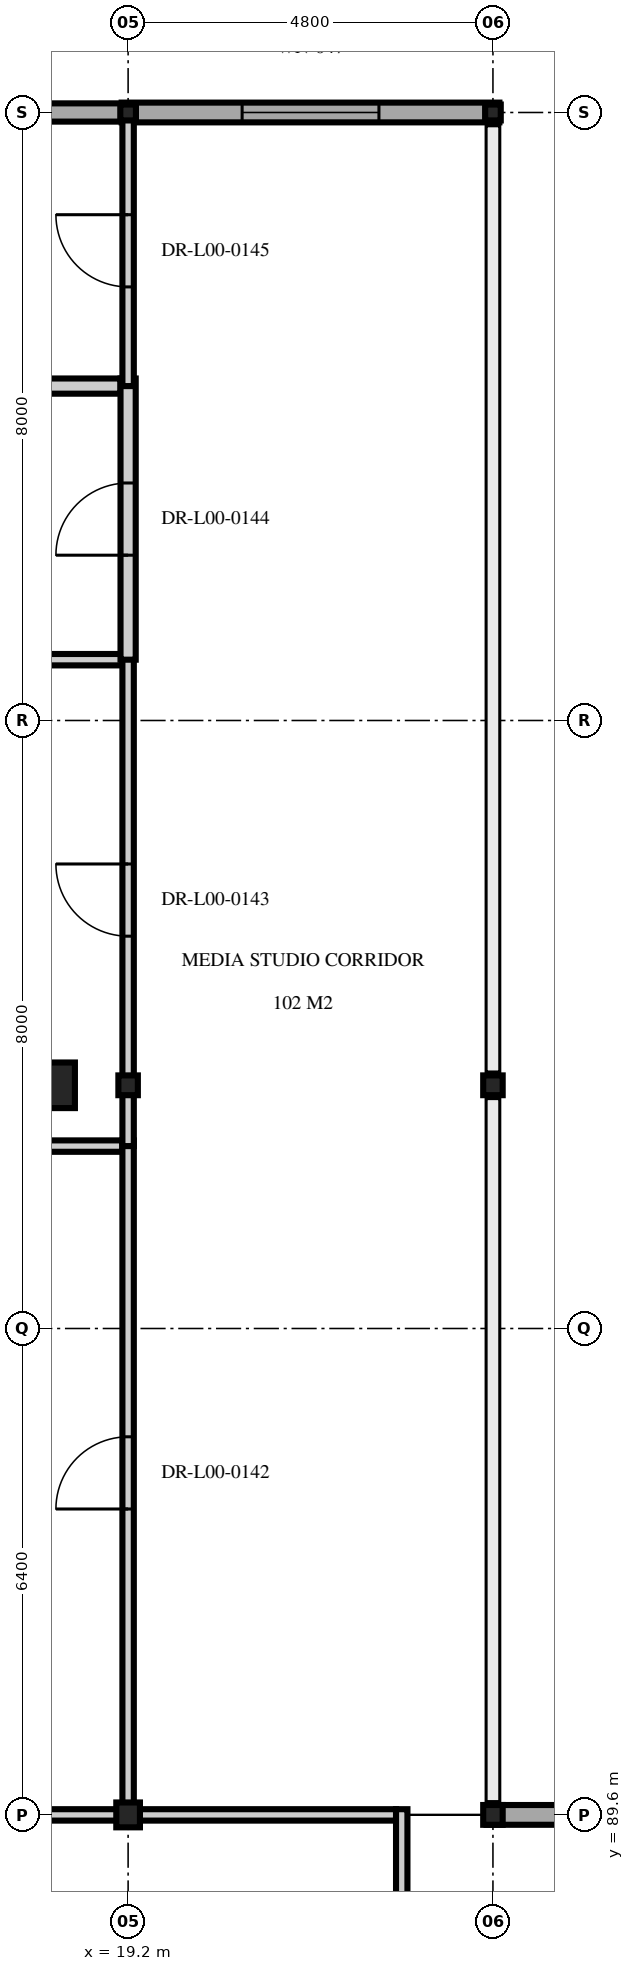
"""IFC4 building model, lengths in metres.
Left out: names, types, materials, properties, quantities, classifications, styles, units other than length and angle.
Written with IfcOpenShell. Run it as: python <this file> out.ifc"""

import sys

from ifc_helpers import new_model, si_unit, direction, frame, frame_2d, origin, origin_2d, place, context, subcontext, project, spatial, rectangle, i_section, extrude, element, fill, save


model = new_model("IFC4")
c1 = context("Model", 3, precision=1e-05, world=origin(), true_north=direction((0.0, 1.0)))
c2 = subcontext(c1, "Body", "Model", "MODEL_VIEW")
j1 = project(units=[si_unit("LENGTHUNIT", "METRE"), si_unit("PLANEANGLEUNIT", "RADIAN")], contexts=[c1])
p1 = place(None, origin())
s1 = spatial("IfcSite", under=j1, at=p1, CompositionType="ELEMENT")
p2 = place(p1, origin())
s2 = spatial("IfcBuilding", under=s1, at=p2, CompositionType="ELEMENT")
p3 = place(p2, origin())
s3 = spatial("IfcBuildingStorey", under=s2, at=p3, CompositionType="ELEMENT", Elevation=0.0)
p4 = place(p3, frame((19.2, 89.6, 0.0), z_axis=(0.0, 0.0, 1.0), x_axis=(1.0, 0.0, 0.0)))
e1 = element("IfcColumn", 1, at=p4, inside=s3, PredefinedType="COLUMN", context=c2, shape_type="SweptSolid", body=[
    extrude(i_section(OverallWidth=0.311, OverallDepth=0.327, WebThickness=0.016, FlangeThickness=0.025, at=origin_2d()), origin(), (0.0, 0.0, 1.0), 5.1),
])
p5 = place(p3, frame((19.2, 99.2, 0.0), z_axis=(0.0, 0.0, 1.0), x_axis=(1.0, 0.0, 0.0)))
e2 = element("IfcColumn", 2, at=p5, inside=s3, PredefinedType="COLUMN", context=c2, shape_type="SweptSolid", body=[
    extrude(i_section(OverallWidth=0.256, OverallDepth=0.26, WebThickness=0.01, FlangeThickness=0.017, at=origin_2d()), origin(), (0.0, 0.0, 1.0), 5.1),
])
p6 = place(p3, frame((19.2, 112.0, 0.0), z_axis=(0.0, 0.0, 1.0), x_axis=(1.0, 0.0, 0.0)))
e3 = element("IfcColumn", 3, at=p6, inside=s3, PredefinedType="COLUMN", context=c2, shape_type="SweptSolid", body=[
    extrude(i_section(OverallWidth=0.206, OverallDepth=0.21, WebThickness=0.01, FlangeThickness=0.014, at=origin_2d()), origin(), (0.0, 0.0, 1.0), 4.91),
])
p7 = place(p3, frame((24.0, 99.2, 0.0), z_axis=(0.0, 0.0, 1.0), x_axis=(1.0, 0.0, 0.0)))
e4 = element("IfcColumn", 4, at=p7, inside=s3, PredefinedType="COLUMN", context=c2, shape_type="SweptSolid", body=[
    extrude(i_section(OverallWidth=0.256, OverallDepth=0.26, WebThickness=0.01, FlangeThickness=0.017, at=origin_2d()), origin(), (0.0, 0.0, 1.0), 5.1),
])
p8 = place(p3, frame((24.0, 112.0, 0.0), z_axis=(0.0, 0.0, 1.0), x_axis=(1.0, 0.0, 0.0)))
e5 = element("IfcColumn", 5, at=p8, inside=s3, PredefinedType="COLUMN", context=c2, shape_type="SweptSolid", body=[
    extrude(i_section(OverallWidth=0.206, OverallDepth=0.21, WebThickness=0.01, FlangeThickness=0.014, at=origin_2d()), origin(), (0.0, 0.0, 1.0), 4.91),
])
p9 = place(p3, frame((24.0, 89.6, 0.0), z_axis=(0.0, 0.0, 1.0), x_axis=(1.0, 0.0, 0.0)))
e6 = element("IfcColumn", 6, at=p9, inside=s3, PredefinedType="COLUMN", context=c2, shape_type="SweptSolid", body=[
    extrude(i_section(OverallWidth=0.256, OverallDepth=0.26, WebThickness=0.01, FlangeThickness=0.017, at=origin_2d()), origin(), (0.0, 0.0, 1.0), 5.1),
])
p10 = place(p3, frame((18.2, 99.2, 0.0), z_axis=(0.0, 0.0, 1.0), x_axis=(1.0, 0.0, 0.0)))
e7 = element("IfcColumn", 7, at=p10, inside=s3, PredefinedType="COLUMN", context=c2, shape_type="SweptSolid", body=[
    extrude(rectangle(XDim=0.6, YDim=0.6, at=origin_2d()), origin(), (0.0, 0.0, 1.0), 5.1),
])
p11 = place(p3, frame((23.915, 89.6, 0.0), z_axis=(0.0, 0.0, 1.0), x_axis=(1.0, 0.0, 0.0)))
e8 = element("IfcWall", 8, at=p11, inside=s3, PredefinedType="SOLIDWALL", context=c2, shape_type="SweptSolid", body=[
    extrude(rectangle(XDim=4.97, YDim=0.26, at=frame_2d((2.485, 0.0))), origin(), (0.0, 0.0, 1.0), 4.355),
])
p12 = place(p3, frame((9.515, 112.0, 0.0), z_axis=(0.0, 0.0, 1.0), x_axis=(1.0, 0.0, 0.0)))
e9 = element("IfcWall", 9, at=p12, inside=s3, PredefinedType="SOLIDWALL", context=c2, shape_type="SweptSolid", body=[
    extrude(rectangle(XDim=9.77, YDim=0.24, at=frame_2d((4.885, 0.0))), origin(), (0.0, 0.0, 1.0), 4.495),
])
p13 = place(p12, frame((3.585, 0.0, 0.0)))
e10 = element("IfcOpeningElement", 10, at=p13, cuts=e9, PredefinedType="OPENING", context=c2, shape_type="SweptSolid", body=[
    extrude(rectangle(XDim=2.6, YDim=2.6, at=frame_2d((1.3, 1.3))), frame((0.0, 0.13, 0.0), z_axis=(0.0, -1.0, 0.0), x_axis=(1.0, 0.0, 0.0)), (0.0, 0.0, 1.0), 0.26),
])
p14 = place(p3, frame((19.115, 112.0, 0.0), z_axis=(0.0, 0.0, 1.0), x_axis=(1.0, 0.0, 0.0)))
e11 = element("IfcWall", 11, at=p14, inside=s3, PredefinedType="SOLIDWALL", context=c2, shape_type="SweptSolid", body=[
    extrude(rectangle(XDim=4.97, YDim=0.26, at=frame_2d((2.485, 0.0))), origin(), (0.0, 0.0, 1.0), 4.495),
])
p15 = place(p14, frame((1.585, 0.0, 1.0)))
e12 = element("IfcOpeningElement", 12, at=p15, cuts=e11, PredefinedType="OPENING", context=c2, shape_type="SweptSolid", body=[
    extrude(rectangle(XDim=1.8, YDim=2.1, at=frame_2d((0.9, 1.05))), frame((0.0, 0.14, 0.0), z_axis=(0.0, -1.0, 0.0), x_axis=(1.0, 0.0, 0.0)), (0.0, 0.0, 1.0), 0.28),
])
p16 = place(p3, frame((0.04, 89.6, 0.0), z_axis=(0.0, 0.0, 1.0), x_axis=(1.0, 0.0, 0.0)))
e13 = element("IfcWall", 13, at=p16, inside=s3, PredefinedType="PARTITIONING", context=c2, shape_type="SweptSolid", body=[
    extrude(rectangle(XDim=22.685, YDim=0.15, at=frame_2d((11.343, 0.0))), origin(), (0.0, 0.0, 1.0), 4.355),
])
p17 = place(p3, frame((22.8, 80.0, 0.0), z_axis=(0.0, 0.0, 1.0), x_axis=(0.0, 1.0, 0.0)))
e14 = element("IfcWall", 14, at=p17, inside=s3, PredefinedType="PARTITIONING", context=c2, shape_type="SweptSolid", body=[
    extrude(rectangle(XDim=9.675, YDim=0.15, at=frame_2d((4.837, 0.0))), origin(), (0.0, 0.0, 1.0), 4.355),
])
p18 = place(p17, frame((4.362, 0.0, 0.0)))
e15 = element("IfcOpeningElement", 15, at=p18, cuts=e14, PredefinedType="OPENING", context=c2, shape_type="SweptSolid", body=[
    extrude(rectangle(XDim=0.95, YDim=2.15, at=frame_2d((0.475, 1.075))), frame((0.0, 0.085, 0.0), z_axis=(0.0, -1.0, 0.0), x_axis=(1.0, 0.0, 0.0)), (0.0, 0.0, 1.0), 0.17),
])
p19 = place(p3, frame((0.04, 98.4, 0.0), z_axis=(0.0, 0.0, 1.0), x_axis=(1.0, 0.0, 0.0)))
e16 = element("IfcWall", 16, at=p19, inside=s3, PredefinedType="PARTITIONING", context=c2, shape_type="SweptSolid", body=[
    extrude(rectangle(XDim=19.085, YDim=0.15, at=frame_2d((9.542, 0.0))), origin(), (0.0, 0.0, 1.0), 4.552),
])
p20 = place(p3, frame((19.2, 89.725, 0.0), z_axis=(0.0, 0.0, 1.0), x_axis=(0.0, 1.0, 0.0)))
e17 = element("IfcWall", 17, at=p20, inside=s3, PredefinedType="PARTITIONING", context=c2, shape_type="SweptSolid", body=[
    extrude(rectangle(XDim=8.75, YDim=0.15, at=frame_2d((4.375, 0.0))), origin(), (0.0, 0.0, 1.0), 4.355),
])
p21 = place(p20, frame((3.9, 0.0, 0.0)))
e18 = element("IfcOpeningElement", 18, at=p21, cuts=e17, PredefinedType="OPENING", context=c2, shape_type="SweptSolid", body=[
    extrude(rectangle(XDim=0.95, YDim=2.15, at=frame_2d((0.475, 1.075))), frame((0.0, 0.085, 0.0), z_axis=(0.0, -1.0, 0.0), x_axis=(1.0, 0.0, 0.0)), (0.0, 0.0, 1.0), 0.17),
])
p22 = place(p3, frame((0.04, 104.8, 0.0), z_axis=(0.0, 0.0, 1.0), x_axis=(1.0, 0.0, 0.0)))
e19 = element("IfcWall", 19, at=p22, inside=s3, PredefinedType="PARTITIONING", context=c2, shape_type="SweptSolid", body=[
    extrude(rectangle(XDim=19.085, YDim=0.15, at=frame_2d((9.542, 0.0))), origin(), (0.0, 0.0, 1.0), 4.525),
])
p23 = place(p3, frame((19.2, 98.4, 0.0), z_axis=(0.0, 0.0, 1.0), x_axis=(0.0, 1.0, 0.0)))
e20 = element("IfcWall", 20, at=p23, inside=s3, PredefinedType="PARTITIONING", context=c2, shape_type="SweptSolid", body=[
    extrude(rectangle(XDim=6.475, YDim=0.15, at=frame_2d((3.238, 0.0))), origin(), (0.0, 0.0, 1.0), 4.495),
])
p24 = place(p23, frame((2.762, 0.0, 0.0)))
e21 = element("IfcOpeningElement", 21, at=p24, cuts=e20, PredefinedType="OPENING", context=c2, shape_type="SweptSolid", body=[
    extrude(rectangle(XDim=0.95, YDim=2.15, at=frame_2d((0.475, 1.075))), frame((0.0, 0.085, 0.0), z_axis=(0.0, -1.0, 0.0), x_axis=(1.0, 0.0, 0.0)), (0.0, 0.0, 1.0), 0.17),
])
p25 = place(p3, frame((0.04, 108.4, 0.0), z_axis=(0.0, 0.0, 1.0), x_axis=(1.0, 0.0, 0.0)))
e22 = element("IfcWall", 22, at=p25, inside=s3, PredefinedType="PARTITIONING", context=c2, shape_type="SweptSolid", body=[
    extrude(rectangle(XDim=19.06, YDim=0.2, at=frame_2d((9.53, 0.0))), origin(), (0.0, 0.0, 1.0), 4.525),
])
p26 = place(p3, frame((19.2, 104.8, 0.0), z_axis=(0.0, 0.0, 1.0), x_axis=(0.0, 1.0, 0.0)))
e23 = element("IfcWall", 23, at=p26, inside=s3, PredefinedType="PARTITIONING", context=c2, shape_type="SweptSolid", body=[
    extrude(rectangle(XDim=3.7, YDim=0.2, at=frame_2d((1.85, 0.0))), origin(), (0.0, 0.0, 1.0), 4.525),
])
p27 = place(p26, frame((1.375, 0.0, 0.0)))
e24 = element("IfcOpeningElement", 24, at=p27, cuts=e23, PredefinedType="OPENING", context=c2, shape_type="SweptSolid", body=[
    extrude(rectangle(XDim=0.95, YDim=2.15, at=frame_2d((0.475, 1.075))), frame((0.0, 0.11, 0.0), z_axis=(0.0, -1.0, 0.0), x_axis=(1.0, 0.0, 0.0)), (0.0, 0.0, 1.0), 0.22),
])
p28 = place(p3, frame((19.2, 108.4, 0.0), z_axis=(0.0, 0.0, 1.0), x_axis=(0.0, 1.0, 0.0)))
e25 = element("IfcWall", 25, at=p28, inside=s3, PredefinedType="PARTITIONING", context=c2, shape_type="SweptSolid", body=[
    extrude(rectangle(XDim=3.56, YDim=0.15, at=frame_2d((1.78, 0.0))), origin(), (0.0, 0.0, 1.0), 4.495),
])
p29 = place(p28, frame((1.305, 0.0, 0.0)))
e26 = element("IfcOpeningElement", 26, at=p29, cuts=e25, PredefinedType="OPENING", context=c2, shape_type="SweptSolid", body=[
    extrude(rectangle(XDim=0.95, YDim=2.15, at=frame_2d((0.475, 1.075))), frame((0.0, 0.085, 0.0), z_axis=(0.0, -1.0, 0.0), x_axis=(1.0, 0.0, 0.0)), (0.0, 0.0, 1.0), 0.17),
])
p30 = place(p15, origin())
e27 = element("IfcWindow", 27, at=p30, inside=s3, PartitioningType="SINGLE_PANEL", PredefinedType="WINDOW", context=c2, shape_type="SweptSolid", body=[
    extrude(rectangle(XDim=1.8, YDim=2.1, at=frame_2d((0.9, 1.05))), frame((0.0, 0.03, 0.0), z_axis=(0.0, -1.0, 0.0), x_axis=(1.0, 0.0, 0.0)), (0.0, 0.0, 1.0), 0.06),
])
fill(e12, e27)
p31 = place(p21, origin())
e28 = element("IfcDoor", 28, at=p31, inside=s3, OperationType="SINGLE_SWING_LEFT", PredefinedType="DOOR", context=c2, shape_type="SweptSolid", body=[
    extrude(rectangle(XDim=0.95, YDim=2.15, at=frame_2d((0.475, 1.075))), frame((0.0, 0.025, 0.0), z_axis=(0.0, -1.0, 0.0), x_axis=(1.0, 0.0, 0.0)), (0.0, 0.0, 1.0), 0.05),
])
fill(e18, e28)
p32 = place(p24, origin())
e29 = element("IfcDoor", 29, at=p32, inside=s3, OperationType="SINGLE_SWING_RIGHT", PredefinedType="DOOR", context=c2, shape_type="SweptSolid", body=[
    extrude(rectangle(XDim=0.95, YDim=2.15, at=frame_2d((0.475, 1.075))), frame((0.0, 0.025, 0.0), z_axis=(0.0, -1.0, 0.0), x_axis=(1.0, 0.0, 0.0)), (0.0, 0.0, 1.0), 0.05),
])
fill(e21, e29)
p33 = place(p27, origin())
e30 = element("IfcDoor", 30, at=p33, inside=s3, OperationType="SINGLE_SWING_LEFT", PredefinedType="DOOR", context=c2, shape_type="SweptSolid", body=[
    extrude(rectangle(XDim=0.95, YDim=2.15, at=frame_2d((0.475, 1.075))), frame((0.0, 0.025, 0.0), z_axis=(0.0, -1.0, 0.0), x_axis=(1.0, 0.0, 0.0)), (0.0, 0.0, 1.0), 0.05),
])
fill(e24, e30)
p34 = place(p29, origin())
e31 = element("IfcDoor", 31, at=p34, inside=s3, OperationType="SINGLE_SWING_RIGHT", PredefinedType="DOOR", context=c2, shape_type="SweptSolid", body=[
    extrude(rectangle(XDim=0.95, YDim=2.15, at=frame_2d((0.475, 1.075))), frame((0.0, 0.025, 0.0), z_axis=(0.0, -1.0, 0.0), x_axis=(1.0, 0.0, 0.0)), (0.0, 0.0, 1.0), 0.05),
])
fill(e26, e31)
save(model, sys.argv[1])
